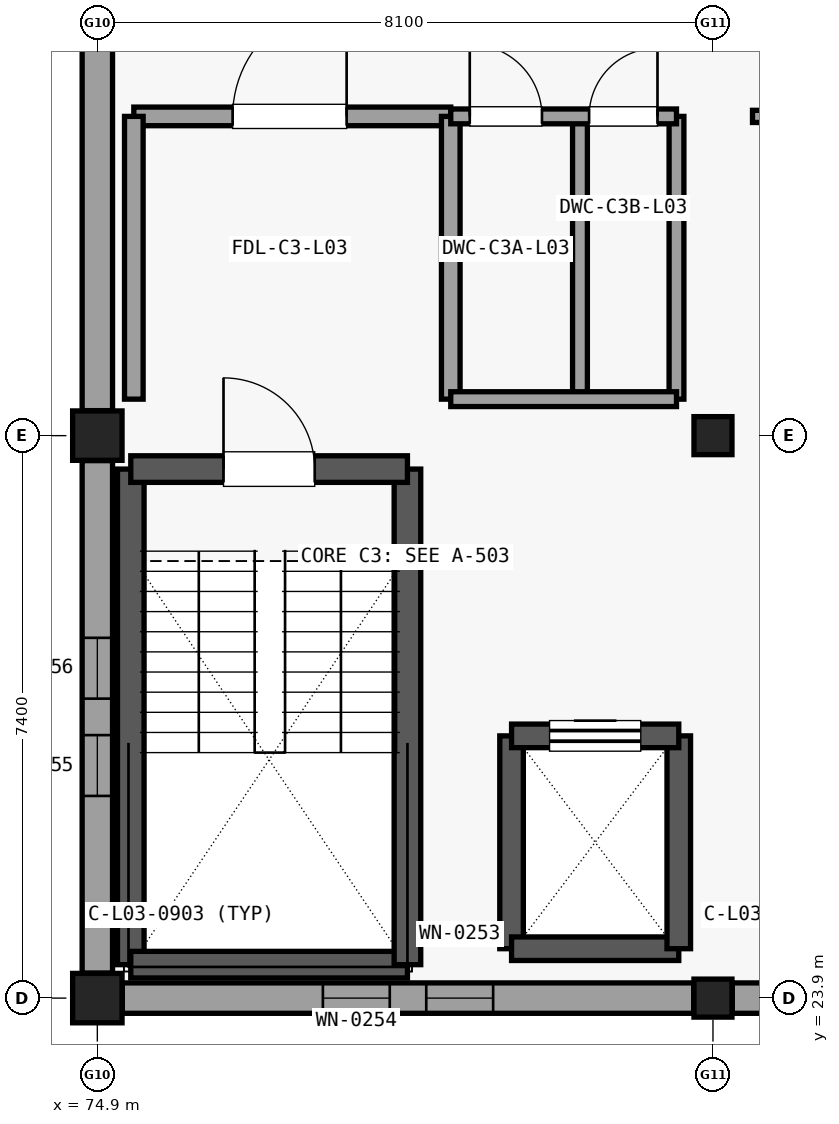
"""IFC4 building model, lengths in metres.
Left out: names, types, materials, properties, quantities, classifications, styles, units other than length and angle.
Written with IfcOpenShell. Run it as: python <this file> out.ifc"""

import sys

from ifc_helpers import new_model, si_unit, direction, frame, frame_2d, origin, origin_2d, place, context, subcontext, project, spatial, rectangle, extrude, element, fill, save


model = new_model("IFC4")
c1 = context("Model", 3, precision=1e-05, world=origin(), true_north=direction((0.0, 1.0)))
c2 = subcontext(c1, "Body", "Model", "MODEL_VIEW")
j1 = project(units=[si_unit("LENGTHUNIT", "METRE"), si_unit("PLANEANGLEUNIT", "RADIAN")], contexts=[c1])
p1 = place(None, origin())
s1 = spatial("IfcSite", under=j1, at=p1, CompositionType="ELEMENT")
p2 = place(p1, origin())
s2 = spatial("IfcBuilding", under=s1, at=p2, CompositionType="ELEMENT")
p3 = place(p2, frame((0.0, 0.0, 13.8)))
s3 = spatial("IfcBuildingStorey", under=s2, at=p3, CompositionType="ELEMENT", Elevation=13.8)
for number, where, z_axis, x_axis in (
    (1, (74.9, 23.9, 0.0), (0.0, 0.0, 1.0), (1.0, 0.0, 0.0)),
    (2, (74.9, 31.3, 0.0), (0.0, 0.0, 1.0), (1.0, 0.0, 0.0)),
):
    element("IfcColumn", number, at=place(p3, frame(where, z_axis=z_axis, x_axis=x_axis)), inside=s3, PredefinedType="COLUMN", context=c2, shape_type="SweptSolid", body=[
        extrude(rectangle(XDim=0.65, YDim=0.65, at=origin_2d()), origin(), (0.0, 0.0, 1.0), 3.38),
    ])
for number, where, z_axis, x_axis in (
    (3, (83.0, 23.9, 0.0), (0.0, 0.0, 1.0), (1.0, 0.0, 0.0)),
    (4, (83.0, 31.3, 0.0), (0.0, 0.0, 1.0), (1.0, 0.0, 0.0)),
):
    element("IfcColumn", number, at=place(p3, frame(where, z_axis=z_axis, x_axis=x_axis)), inside=s3, PredefinedType="COLUMN", context=c2, shape_type="SweptSolid", body=[
        extrude(rectangle(XDim=0.5, YDim=0.5, at=origin_2d()), origin(), (0.0, 0.0, 1.0), 3.38),
    ])
p4 = place(p3, frame((82.746, 23.9, 0.0), z_axis=(0.0, 0.0, 1.0), x_axis=(-1.0, 0.0, 0.0)))
e5 = element("IfcWall", 5, at=p4, inside=s3, PredefinedType="SOLIDWALL", context=c2, shape_type="SweptSolid", body=[
    extrude(rectangle(XDim=7.517, YDim=0.4, at=frame_2d((3.759, 0.0))), origin(), (0.0, 0.0, 1.0), 2.832),
])
p5 = place(p4, frame((2.638, 0.0, 0.6)))
e6 = element("IfcOpeningElement", 6, at=p5, cuts=e5, PredefinedType="OPENING", context=c2, shape_type="SweptSolid", body=[
    extrude(rectangle(XDim=0.88, YDim=1.9, at=frame_2d((0.44, 0.95))), frame((0.0, 0.21, 0.0), z_axis=(0.0, -1.0, 0.0), x_axis=(1.0, 0.0, 0.0)), (0.0, 0.0, 1.0), 0.42),
])
p6 = place(p4, frame((3.999, 0.0, 0.6)))
e7 = element("IfcOpeningElement", 7, at=p6, cuts=e5, PredefinedType="OPENING", context=c2, shape_type="SweptSolid", body=[
    extrude(rectangle(XDim=0.88, YDim=1.9, at=frame_2d((0.44, 0.95))), frame((0.0, 0.21, 0.0), z_axis=(0.0, -1.0, 0.0), x_axis=(1.0, 0.0, 0.0)), (0.0, 0.0, 1.0), 0.42),
])
p7 = place(p3, frame((74.9, 24.229, 0.0), z_axis=(0.0, 0.0, 1.0), x_axis=(0.0, 1.0, 0.0)))
e8 = element("IfcWall", 8, at=p7, inside=s3, PredefinedType="SOLIDWALL", context=c2, shape_type="SweptSolid", body=[
    extrude(rectangle(XDim=6.742, YDim=0.4, at=frame_2d((3.371, 0.0))), origin(), (0.0, 0.0, 1.0), 2.832),
])
p8 = place(p7, frame((2.331, 0.0, 0.6)))
e9 = element("IfcOpeningElement", 9, at=p8, cuts=e8, PredefinedType="OPENING", context=c2, shape_type="SweptSolid", body=[
    extrude(rectangle(XDim=0.8, YDim=1.92, at=frame_2d((0.4, 0.96))), frame((0.0, 0.21, 0.0), z_axis=(0.0, -1.0, 0.0), x_axis=(1.0, 0.0, 0.0)), (0.0, 0.0, 1.0), 0.42),
])
p9 = place(p7, frame((3.611, 0.0, 0.6)))
e10 = element("IfcOpeningElement", 10, at=p9, cuts=e8, PredefinedType="OPENING", context=c2, shape_type="SweptSolid", body=[
    extrude(rectangle(XDim=0.8, YDim=1.92, at=frame_2d((0.4, 0.96))), frame((0.0, 0.21, 0.0), z_axis=(0.0, -1.0, 0.0), x_axis=(1.0, 0.0, 0.0)), (0.0, 0.0, 1.0), 0.42),
])
p10 = place(p3, frame((74.9, 31.629, 0.0), z_axis=(0.0, 0.0, 1.0), x_axis=(0.0, 1.0, 0.0)))
e11 = element("IfcWall", 11, at=p10, inside=s3, PredefinedType="SOLIDWALL", context=c2, shape_type="SweptSolid", body=[
    extrude(rectangle(XDim=6.742, YDim=0.4, at=frame_2d((3.371, 0.0))), origin(), (0.0, 0.0, 1.0), 2.603),
])
p11 = place(p3, frame((90.846, 23.9, 0.0), z_axis=(0.0, 0.0, 1.0), x_axis=(-1.0, 0.0, 0.0)))
e12 = element("IfcWall", 12, at=p11, inside=s3, PredefinedType="SOLIDWALL", context=c2, shape_type="SweptSolid", body=[
    extrude(rectangle(XDim=7.592, YDim=0.4, at=frame_2d((3.796, 0.0))), origin(), (0.0, 0.0, 1.0), 2.908),
])
p12 = place(p11, frame((2.676, 0.0, 0.6)))
e13 = element("IfcOpeningElement", 13, at=p12, cuts=e12, PredefinedType="OPENING", context=c2, shape_type="SweptSolid", body=[
    extrude(rectangle(XDim=0.88, YDim=1.9, at=frame_2d((0.44, 0.95))), frame((0.0, 0.21, 0.0), z_axis=(0.0, -1.0, 0.0), x_axis=(1.0, 0.0, 0.0)), (0.0, 0.0, 1.0), 0.42),
])
p13 = place(p11, frame((4.036, 0.0, 0.6)))
e14 = element("IfcOpeningElement", 14, at=p13, cuts=e12, PredefinedType="OPENING", context=c2, shape_type="SweptSolid", body=[
    extrude(rectangle(XDim=0.88, YDim=1.9, at=frame_2d((0.44, 0.95))), frame((0.0, 0.21, 0.0), z_axis=(0.0, -1.0, 0.0), x_axis=(1.0, 0.0, 0.0)), (0.0, 0.0, 1.0), 0.42),
])
p14 = place(p3, frame((75.34, 24.34, 0.0), z_axis=(0.0, 0.0, 1.0), x_axis=(0.0, 1.0, 0.0)))
e15 = element("IfcWall", 15, at=p14, inside=s3, PredefinedType="SHEAR", context=c2, shape_type="SweptSolid", body=[
    extrude(rectangle(XDim=6.52, YDim=0.35, at=frame_2d((3.26, 0.0))), origin(), (0.0, 0.0, 1.0), 3.375),
])
p15 = place(p3, frame((75.34, 24.34, 0.0), z_axis=(0.0, 0.0, 1.0), x_axis=(1.0, 0.0, 0.0)))
e16 = element("IfcWall", 16, at=p15, inside=s3, PredefinedType="SHEAR", context=c2, shape_type="SweptSolid", body=[
    extrude(rectangle(XDim=3.64, YDim=0.35, at=frame_2d((1.82, 0.0))), origin(), (0.0, 0.0, 1.0), 3.375),
])
p16 = place(p3, frame((78.98, 24.34, 0.0), z_axis=(0.0, 0.0, 1.0), x_axis=(0.0, 1.0, 0.0)))
e17 = element("IfcWall", 17, at=p16, inside=s3, PredefinedType="SHEAR", context=c2, shape_type="SweptSolid", body=[
    extrude(rectangle(XDim=6.52, YDim=0.35, at=frame_2d((3.26, 0.0))), origin(), (0.0, 0.0, 1.0), 3.375),
])
p17 = place(p3, frame((75.34, 30.86, 0.0), z_axis=(0.0, 0.0, 1.0), x_axis=(1.0, 0.0, 0.0)))
e18 = element("IfcWall", 18, at=p17, inside=s3, PredefinedType="SHEAR", context=c2, shape_type="SweptSolid", body=[
    extrude(rectangle(XDim=3.64, YDim=0.35, at=frame_2d((1.82, 0.0))), origin(), (0.0, 0.0, 1.0), 3.375),
])
p18 = place(p17, frame((1.22, 0.0, 0.0)))
e19 = element("IfcOpeningElement", 19, at=p18, cuts=e18, PredefinedType="OPENING", context=c2, shape_type="SweptSolid", body=[
    extrude(rectangle(XDim=1.2, YDim=2.15, at=frame_2d((0.6, 1.075))), frame((0.0, 0.185, 0.0), z_axis=(0.0, -1.0, 0.0), x_axis=(1.0, 0.0, 0.0)), (0.0, 0.0, 1.0), 0.37),
])
p19 = place(p3, frame((80.35, 24.55, 0.0), z_axis=(0.0, 0.0, 1.0), x_axis=(0.0, 1.0, 0.0)))
e20 = element("IfcWall", 20, at=p19, inside=s3, PredefinedType="SHEAR", context=c2, shape_type="SweptSolid", body=[
    extrude(rectangle(XDim=2.8, YDim=0.31, at=frame_2d((1.4, 0.0))), origin(), (0.0, 0.0, 1.0), 3.375),
])
p20 = place(p3, frame((80.35, 24.55, 0.0), z_axis=(0.0, 0.0, 1.0), x_axis=(1.0, 0.0, 0.0)))
e21 = element("IfcWall", 21, at=p20, inside=s3, PredefinedType="SHEAR", context=c2, shape_type="SweptSolid", body=[
    extrude(rectangle(XDim=2.2, YDim=0.31, at=frame_2d((1.1, 0.0))), origin(), (0.0, 0.0, 1.0), 3.375),
])
p21 = place(p3, frame((82.55, 24.55, 0.0), z_axis=(0.0, 0.0, 1.0), x_axis=(0.0, 1.0, 0.0)))
e22 = element("IfcWall", 22, at=p21, inside=s3, PredefinedType="SHEAR", context=c2, shape_type="SweptSolid", body=[
    extrude(rectangle(XDim=2.8, YDim=0.31, at=frame_2d((1.4, 0.0))), origin(), (0.0, 0.0, 1.0), 3.375),
])
p22 = place(p3, frame((80.35, 27.35, 0.0), z_axis=(0.0, 0.0, 1.0), x_axis=(1.0, 0.0, 0.0)))
e23 = element("IfcWall", 23, at=p22, inside=s3, PredefinedType="SHEAR", context=c2, shape_type="SweptSolid", body=[
    extrude(rectangle(XDim=2.2, YDim=0.31, at=frame_2d((1.1, 0.0))), origin(), (0.0, 0.0, 1.0), 3.375),
])
p23 = place(p22, frame((0.5, 0.0, 0.0)))
e24 = element("IfcOpeningElement", 24, at=p23, cuts=e23, PredefinedType="OPENING", context=c2, shape_type="SweptSolid", body=[
    extrude(rectangle(XDim=1.2, YDim=2.15, at=frame_2d((0.6, 1.075))), frame((0.0, 0.165, 0.0), z_axis=(0.0, -1.0, 0.0), x_axis=(1.0, 0.0, 0.0)), (0.0, 0.0, 1.0), 0.33),
])
p24 = place(p3, frame((75.38, 35.5, 0.0), z_axis=(0.0, 0.0, 1.0), x_axis=(1.0, 0.0, 0.0)))
e25 = element("IfcWall", 25, at=p24, inside=s3, PredefinedType="PARTITIONING", context=c2, shape_type="SweptSolid", body=[
    extrude(rectangle(XDim=4.17, YDim=0.245, at=frame_2d((2.085, 0.0))), origin(), (0.0, 0.0, 1.0), 2.837),
])
p25 = place(p24, frame((1.3, 0.0, 0.0)))
e26 = element("IfcOpeningElement", 26, at=p25, cuts=e25, PredefinedType="OPENING", context=c2, shape_type="SweptSolid", body=[
    extrude(rectangle(XDim=1.5, YDim=2.15, at=frame_2d((0.75, 1.075))), frame((0.0, 0.133, 0.0), z_axis=(0.0, -1.0, 0.0), x_axis=(1.0, 0.0, 0.0)), (0.0, 0.0, 1.0), 0.265),
])
p26 = place(p3, frame((75.38, 31.78, 0.0), z_axis=(0.0, 0.0, 1.0), x_axis=(0.0, 1.0, 0.0)))
e27 = element("IfcWall", 27, at=p26, inside=s3, PredefinedType="PARTITIONING", context=c2, shape_type="SweptSolid", body=[
    extrude(rectangle(XDim=3.72, YDim=0.245, at=frame_2d((1.86, 0.0))), origin(), (0.0, 0.0, 1.0), 2.837),
])
p27 = place(p3, frame((79.55, 31.78, 0.0), z_axis=(0.0, 0.0, 1.0), x_axis=(0.0, 1.0, 0.0)))
e28 = element("IfcWall", 28, at=p27, inside=s3, PredefinedType="PARTITIONING", context=c2, shape_type="SweptSolid", body=[
    extrude(rectangle(XDim=3.72, YDim=0.245, at=frame_2d((1.86, 0.0))), origin(), (0.0, 0.0, 1.0), 2.913),
])
for number, where, z_axis, x_axis in (
    (29, (81.25, 31.78, 0.0), (0.0, 0.0, 1.0), (0.0, 1.0, 0.0)),
    (30, (82.52, 31.78, 0.0), (0.0, 0.0, 1.0), (0.0, 1.0, 0.0)),
):
    element("IfcWall", number, at=place(p3, frame(where, z_axis=z_axis, x_axis=x_axis)), inside=s3, PredefinedType="PARTITIONING", context=c2, shape_type="SweptSolid", body=[
        extrude(rectangle(XDim=3.72, YDim=0.195, at=frame_2d((1.86, 0.0))), origin(), (0.0, 0.0, 1.0), 2.913),
    ])
p28 = place(p3, frame((79.55, 31.78, 0.0), z_axis=(0.0, 0.0, 1.0), x_axis=(1.0, 0.0, 0.0)))
e31 = element("IfcWall", 31, at=p28, inside=s3, PredefinedType="PARTITIONING", context=c2, shape_type="SweptSolid", body=[
    extrude(rectangle(XDim=2.97, YDim=0.195, at=frame_2d((1.485, 0.0))), origin(), (0.0, 0.0, 1.0), 2.913),
])
p29 = place(p3, frame((79.55, 35.5, 0.0), z_axis=(0.0, 0.0, 1.0), x_axis=(1.0, 0.0, 0.0)))
e32 = element("IfcWall", 32, at=p29, inside=s3, PredefinedType="PARTITIONING", context=c2, shape_type="SweptSolid", body=[
    extrude(rectangle(XDim=2.97, YDim=0.195, at=frame_2d((1.485, 0.0))), origin(), (0.0, 0.0, 1.0), 3.365),
])
p30 = place(p29, frame((0.25, 0.0, 0.0)))
e33 = element("IfcOpeningElement", 33, at=p30, cuts=e32, PredefinedType="OPENING", context=c2, shape_type="SweptSolid", body=[
    extrude(rectangle(XDim=0.95, YDim=2.1, at=frame_2d((0.475, 1.05))), frame((0.0, 0.107, 0.0), z_axis=(0.0, -1.0, 0.0), x_axis=(1.0, 0.0, 0.0)), (0.0, 0.0, 1.0), 0.215),
])
p31 = place(p29, frame((1.82, 0.0, 0.0)))
e34 = element("IfcOpeningElement", 34, at=p31, cuts=e32, PredefinedType="OPENING", context=c2, shape_type="SweptSolid", body=[
    extrude(rectangle(XDim=0.9, YDim=2.1, at=frame_2d((0.45, 1.05))), frame((0.0, 0.107, 0.0), z_axis=(0.0, -1.0, 0.0), x_axis=(1.0, 0.0, 0.0)), (0.0, 0.0, 1.0), 0.215),
])
p32 = place(p3, frame((83.52, 35.5, 0.0), z_axis=(0.0, 0.0, 1.0), x_axis=(1.0, 0.0, 0.0)))
e35 = element("IfcWall", 35, at=p32, inside=s3, PredefinedType="PARTITIONING", context=c2, shape_type="SweptSolid", body=[
    extrude(rectangle(XDim=7.06, YDim=0.16, at=frame_2d((3.53, 0.0))), origin(), (0.0, 0.0, 1.0), 3.365),
])
p33 = place(p32, frame((2.855, 0.0, 0.0)))
e36 = element("IfcOpeningElement", 36, at=p33, cuts=e35, PredefinedType="OPENING", context=c2, shape_type="SweptSolid", body=[
    extrude(rectangle(XDim=1.35, YDim=2.2, at=frame_2d((0.675, 1.1))), frame((0.0, 0.09, 0.0), z_axis=(0.0, -1.0, 0.0), x_axis=(1.0, 0.0, 0.0)), (0.0, 0.0, 1.0), 0.18),
])
p34 = place(p5, origin())
e37 = element("IfcWindow", 37, at=p34, inside=s3, PartitioningType="SINGLE_PANEL", PredefinedType="WINDOW", context=c2, shape_type="SweptSolid", body=[
    extrude(rectangle(XDim=0.88, YDim=1.9, at=frame_2d((0.44, 0.95))), frame((0.0, 0.03, 0.0), z_axis=(0.0, -1.0, 0.0), x_axis=(1.0, 0.0, 0.0)), (0.0, 0.0, 1.0), 0.06),
])
fill(e6, e37)
p35 = place(p6, origin())
e38 = element("IfcWindow", 38, at=p35, inside=s3, PartitioningType="SINGLE_PANEL", PredefinedType="WINDOW", context=c2, shape_type="SweptSolid", body=[
    extrude(rectangle(XDim=0.88, YDim=1.9, at=frame_2d((0.44, 0.95))), frame((0.0, 0.03, 0.0), z_axis=(0.0, -1.0, 0.0), x_axis=(1.0, 0.0, 0.0)), (0.0, 0.0, 1.0), 0.06),
])
fill(e7, e38)
p36 = place(p8, origin())
e39 = element("IfcWindow", 39, at=p36, inside=s3, PartitioningType="SINGLE_PANEL", PredefinedType="WINDOW", context=c2, shape_type="SweptSolid", body=[
    extrude(rectangle(XDim=0.8, YDim=1.92, at=frame_2d((0.4, 0.96))), frame((0.0, 0.03, 0.0), z_axis=(0.0, -1.0, 0.0), x_axis=(1.0, 0.0, 0.0)), (0.0, 0.0, 1.0), 0.06),
])
fill(e9, e39)
p37 = place(p9, origin())
e40 = element("IfcWindow", 40, at=p37, inside=s3, PartitioningType="SINGLE_PANEL", PredefinedType="WINDOW", context=c2, shape_type="SweptSolid", body=[
    extrude(rectangle(XDim=0.8, YDim=1.92, at=frame_2d((0.4, 0.96))), frame((0.0, 0.03, 0.0), z_axis=(0.0, -1.0, 0.0), x_axis=(1.0, 0.0, 0.0)), (0.0, 0.0, 1.0), 0.06),
])
fill(e10, e40)
p38 = place(p18, origin())
e41 = element("IfcDoor", 41, at=p38, inside=s3, OperationType="SINGLE_SWING_LEFT", PredefinedType="DOOR", context=c2, shape_type="SweptSolid", body=[
    extrude(rectangle(XDim=1.2, YDim=2.15, at=frame_2d((0.6, 1.075))), frame((0.0, 0.025, 0.0), z_axis=(0.0, -1.0, 0.0), x_axis=(1.0, 0.0, 0.0)), (0.0, 0.0, 1.0), 0.05),
])
fill(e19, e41)
p39 = place(p23, origin())
e42 = element("IfcDoor", 42, at=p39, inside=s3, OperationType="SLIDING_TO_LEFT", PredefinedType="DOOR", context=c2, shape_type="SweptSolid", body=[
    extrude(rectangle(XDim=1.2, YDim=2.15, at=frame_2d((0.6, 1.075))), frame((0.0, 0.025, 0.0), z_axis=(0.0, -1.0, 0.0), x_axis=(1.0, 0.0, 0.0)), (0.0, 0.0, 1.0), 0.05),
])
fill(e24, e42)
p40 = place(p25, origin())
e43 = element("IfcDoor", 43, at=p40, inside=s3, OperationType="SINGLE_SWING_RIGHT", PredefinedType="DOOR", context=c2, shape_type="SweptSolid", body=[
    extrude(rectangle(XDim=1.5, YDim=2.15, at=frame_2d((0.75, 1.075))), frame((0.0, 0.025, 0.0), z_axis=(0.0, -1.0, 0.0), x_axis=(1.0, 0.0, 0.0)), (0.0, 0.0, 1.0), 0.05),
])
fill(e26, e43)
p41 = place(p30, origin())
e44 = element("IfcDoor", 44, at=p41, inside=s3, OperationType="SINGLE_SWING_LEFT", PredefinedType="DOOR", context=c2, shape_type="SweptSolid", body=[
    extrude(rectangle(XDim=0.95, YDim=2.1, at=frame_2d((0.475, 1.05))), frame((0.0, 0.025, 0.0), z_axis=(0.0, -1.0, 0.0), x_axis=(1.0, 0.0, 0.0)), (0.0, 0.0, 1.0), 0.05),
])
fill(e33, e44)
p42 = place(p31, origin())
e45 = element("IfcDoor", 45, at=p42, inside=s3, OperationType="SINGLE_SWING_RIGHT", PredefinedType="DOOR", context=c2, shape_type="SweptSolid", body=[
    extrude(rectangle(XDim=0.9, YDim=2.1, at=frame_2d((0.45, 1.05))), frame((0.0, 0.025, 0.0), z_axis=(0.0, -1.0, 0.0), x_axis=(1.0, 0.0, 0.0)), (0.0, 0.0, 1.0), 0.05),
])
fill(e34, e45)
save(model, sys.argv[1])
